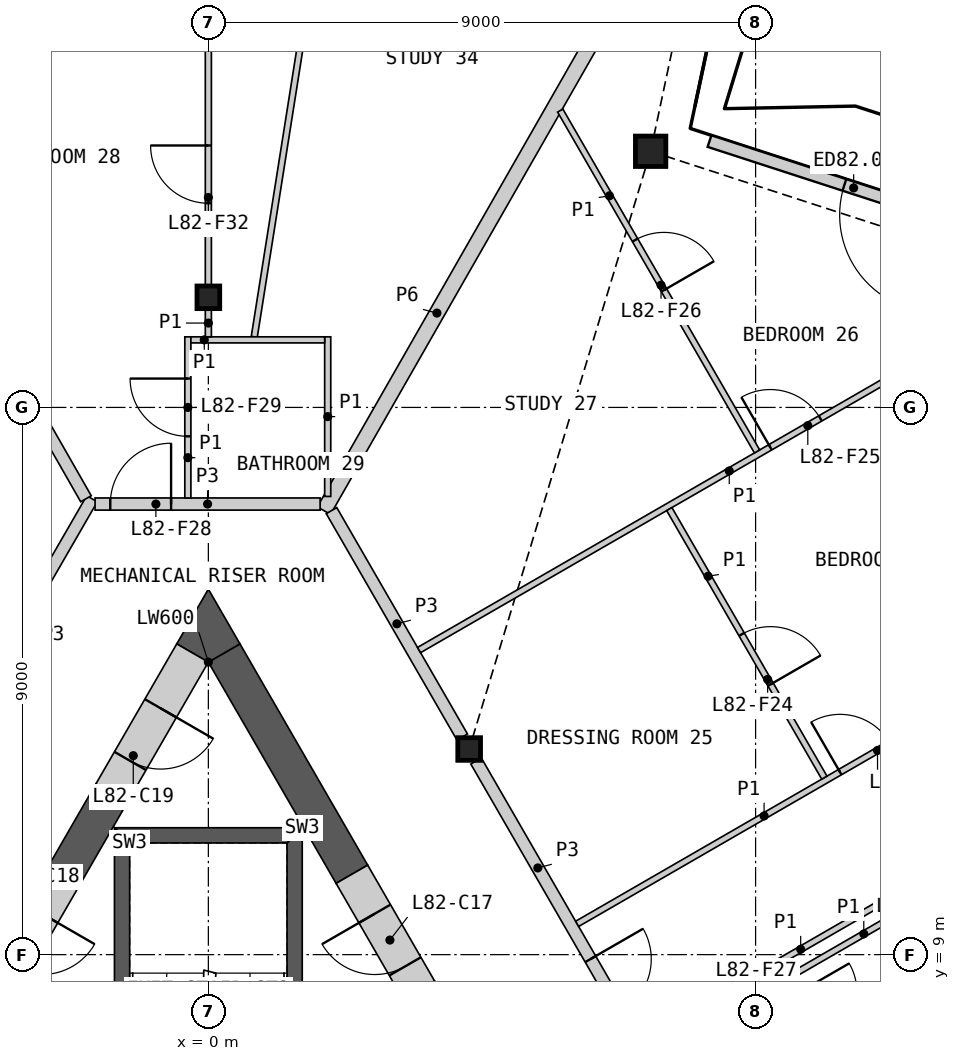
"""IFC4 building model, lengths in metres.
Left out: names, types, materials, properties, quantities, classifications, styles, units other than length and angle.
Written with IfcOpenShell. Run it as: python <this file> out.ifc"""

import sys

from ifc_helpers import new_model, si_unit, direction, frame, frame_2d, origin, origin_2d, place, context, subcontext, project, spatial, polyline, rectangle, hollow_rectangle, i_section, outline, extrude, element, fill, save


model = new_model("IFC4")
c1 = context("Model", 3, precision=1e-05, world=origin(), true_north=direction((0.0, 1.0)))
c2 = subcontext(c1, "Body", "Model", "MODEL_VIEW")
j1 = project(units=[si_unit("LENGTHUNIT", "METRE"), si_unit("PLANEANGLEUNIT", "RADIAN")], contexts=[c1])
p1 = place(None, origin())
s1 = spatial("IfcSite", under=j1, at=p1, CompositionType="ELEMENT")
p2 = place(p1, origin())
s2 = spatial("IfcBuilding", under=s1, at=p2, CompositionType="ELEMENT")
p3 = place(p2, frame((0.0, 0.0, 367.8)))
s3 = spatial("IfcBuildingStorey", under=s2, at=p3, CompositionType="ELEMENT", Elevation=367.8)
p4 = place(p3, frame((7.274, 22.213, 0.0), z_axis=(0.0, 0.0, 1.0), x_axis=(1.0, 0.0, 0.0)))
e1 = element("IfcColumn", 1, at=p4, inside=s3, PredefinedType="COLUMN", context=c2, shape_type="SweptSolid", body=[
    extrude(hollow_rectangle(XDim=0.5, YDim=0.5, WallThickness=0.03, at=origin_2d()), origin(), (0.0, 0.0, 1.0), 3.4),
])
for number, where, z_axis, x_axis in (
    (2, (0.0, 19.811, 0.0), (0.0, 0.0, 1.0), (1.0, 0.0, 0.0)),
    (3, (4.289, 12.382, 0.0), (0.0, 0.0, 1.0), (1.0, 0.0, 0.0)),
):
    element("IfcColumn", number, at=place(p3, frame(where, z_axis=z_axis, x_axis=x_axis)), inside=s3, PredefinedType="COLUMN", context=c2, shape_type="SweptSolid", body=[
        extrude(i_section(OverallWidth=0.374, OverallDepth=0.372, WebThickness=0.016, FlangeThickness=0.026, at=origin_2d()), origin(), (0.0, 0.0, 1.0), 3.4),
    ])
p5 = place(p3, frame((14.331, 20.402, 0.0), z_axis=(0.0, 0.0, 1.0), x_axis=(-0.951058447414, 0.30901105094, 0.0)))
e4 = element("IfcWall", 4, at=p5, inside=s3, PredefinedType="SOLIDWALL", context=c2, shape_type="SweptSolid", body=[
    extrude(rectangle(XDim=6.402, YDim=0.2, at=frame_2d((3.201, 0.0))), origin(), (0.0, 0.0, 1.0), 2.634),
])
p6 = place(p5, frame((2.469, 0.0, 0.0)))
e5 = element("IfcOpeningElement", 5, at=p6, cuts=e4, PredefinedType="OPENING", context=c2, shape_type="SweptSolid", body=[
    extrude(rectangle(XDim=1.6, YDim=2.25, at=frame_2d((0.8, 1.125))), frame((0.0, 0.11, 0.0), z_axis=(0.0, -1.0, 0.0), x_axis=(1.0, 0.0, 0.0)), (0.0, 0.0, 1.0), 0.22),
])
p7 = place(p3, origin())
e6 = element("IfcWall", 6, at=p7, inside=s3, PredefinedType="SHEAR", context=c2, shape_type="SweptSolid", body=[
    extrude(outline(polyline([(1.544, 5.237), (1.544, 11.087), (1.294, 10.837), (1.294, 5.237), (1.544, 5.237)])), origin(), (0.0, 0.0, 1.0), 3.1),
])
p8 = place(p3, origin())
e7 = element("IfcWall", 7, at=p8, inside=s3, PredefinedType="SHEAR", context=c2, shape_type="SweptSolid", body=[
    extrude(outline(polyline([(1.544, 11.087), (-1.544, 11.087), (-1.294, 10.837), (1.294, 10.837), (1.544, 11.087)])), origin(), (0.0, 0.0, 1.0), 3.1),
])
p9 = place(p3, origin())
e8 = element("IfcWall", 8, at=p9, inside=s3, PredefinedType="SHEAR", context=c2, shape_type="SweptSolid", body=[
    extrude(outline(polyline([(-1.294, 10.837), (-1.544, 11.087), (-1.544, 5.237), (-1.294, 5.237), (-1.294, 10.837)])), origin(), (0.0, 0.0, 1.0), 3.1),
])
p10 = place(p3, frame((8.686, -0.634, 0.0), z_axis=(0.0, 0.0, 1.0), x_axis=(-0.50001836461, 0.866014800712, 0.0)))
e9 = element("IfcWall", 9, at=p10, inside=s3, PredefinedType="SHEAR", context=c2, shape_type="SweptSolid", body=[
    extrude(rectangle(XDim=10.451, YDim=0.6, at=frame_2d((5.225, 0.0))), origin(), (0.0, 0.0, 1.0), 3.1),
])
p11 = place(p3, frame((2.361, 10.322, 0.0), z_axis=(0.0, 0.0, 1.0), x_axis=(-0.500000735859, 0.866024978935, 0.0)))
e10 = element("IfcWall", 10, at=p11, inside=s3, PredefinedType="SHEAR", context=c2, shape_type="SweptSolid", body=[
    extrude(rectangle(XDim=4.202, YDim=0.6, at=frame_2d((2.101, 0.0))), origin(), (0.0, 0.0, 1.0), 3.1),
])
p12 = place(p3, frame((-1.59, 11.658, 0.0), z_axis=(0.0, 0.0, 1.0), x_axis=(-0.500037594623, -0.866003697431, 0.0)))
e11 = element("IfcWall", 11, at=p12, inside=s3, PredefinedType="SHEAR", context=c2, shape_type="SweptSolid", body=[
    extrude(rectangle(XDim=1.542, YDim=0.6, at=frame_2d((0.771, 0.0))), origin(), (0.0, 0.0, 1.0), 3.1),
])
p13 = place(p3, origin())
e12 = element("IfcWall", 12, at=p13, inside=s3, PredefinedType="SHEAR", context=c2, shape_type="SweptSolid", body=[
    extrude(outline(polyline([(0.0, 13.811), (-0.52, 14.111), (0.0, 15.011), (0.52, 14.111), (0.0, 13.811)])), origin(), (0.0, 0.0, 1.0), 3.1),
])
p14 = place(p3, frame((3.461, 8.417, 0.0), z_axis=(0.0, 0.0, 1.0), x_axis=(-0.499946605688, 0.86605622881, 0.0)))
e13 = element("IfcWall", 13, at=p14, inside=s3, PredefinedType="SHEAR", context=c2, shape_type="SweptSolid", body=[
    extrude(rectangle(XDim=2.2, YDim=0.6, at=frame_2d((1.1, 0.0))), origin(), (0.0, 0.0, 1.0), 3.1),
])
p15 = place(p14, frame((0.45, 0.0, 0.0)))
e14 = element("IfcOpeningElement", 14, at=p15, cuts=e13, PredefinedType="OPENING", context=c2, shape_type="SweptSolid", body=[
    extrude(rectangle(XDim=1.0, YDim=2.1, at=frame_2d((0.5, 1.05))), frame((0.0, 0.31, 0.0), z_axis=(0.0, -1.0, 0.0), x_axis=(1.0, 0.0, 0.0)), (0.0, 0.0, 1.0), 0.62),
])
p16 = place(p3, frame((-2.361, 10.322, 0.0), z_axis=(0.0, 0.0, 1.0), x_axis=(-0.499946605688, -0.86605622881, 0.0)))
e15 = element("IfcWall", 15, at=p16, inside=s3, PredefinedType="SHEAR", context=c2, shape_type="SweptSolid", body=[
    extrude(rectangle(XDim=2.2, YDim=0.6, at=frame_2d((1.1, 0.0))), origin(), (0.0, 0.0, 1.0), 3.1),
])
p17 = place(p16, frame((0.75, 0.0, 0.0)))
e16 = element("IfcOpeningElement", 16, at=p17, cuts=e15, PredefinedType="OPENING", context=c2, shape_type="SweptSolid", body=[
    extrude(rectangle(XDim=1.0, YDim=2.1, at=frame_2d((0.5, 1.05))), frame((0.0, 0.31, 0.0), z_axis=(0.0, -1.0, 0.0), x_axis=(1.0, 0.0, 0.0)), (0.0, 0.0, 1.0), 0.62),
])
p18 = place(p3, frame((-0.26, 13.961, 0.0), z_axis=(0.0, 0.0, 1.0), x_axis=(-0.49997936161, -0.866037319036, 0.0)))
e17 = element("IfcWall", 17, at=p18, inside=s3, PredefinedType="SHEAR", context=c2, shape_type="SweptSolid", body=[
    extrude(rectangle(XDim=2.66, YDim=0.6, at=frame_2d((1.33, 0.0))), origin(), (0.0, 0.0, 1.0), 3.1),
])
p19 = place(p18, frame((1.05, 0.0, 0.0)))
e18 = element("IfcOpeningElement", 18, at=p19, cuts=e17, PredefinedType="OPENING", context=c2, shape_type="SweptSolid", body=[
    extrude(rectangle(XDim=1.0, YDim=2.1, at=frame_2d((0.5, 1.05))), frame((0.0, 0.31, 0.0), z_axis=(0.0, -1.0, 0.0), x_axis=(1.0, 0.0, 0.0)), (0.0, 0.0, 1.0), 0.62),
])
p20 = place(p3, frame((1.901, 16.302, 0.0), z_axis=(0.0, 0.0, 1.0), x_axis=(0.496368960053, 0.86811166073, 0.0)))
e19 = element("IfcWall", 19, at=p20, inside=s3, PredefinedType="PARTITIONING", context=c2, shape_type="SweptSolid", body=[
    extrude(rectangle(XDim=14.972, YDim=0.25, at=frame_2d((7.486, 0.0))), origin(), (0.0, 0.0, 1.0), 2.33),
])
p21 = place(p3, frame((4.403, 12.185, 0.0), z_axis=(0.0, 0.0, 1.0), x_axis=(0.499992155518, -0.866029932751, 0.0)))
e20 = element("IfcWall", 20, at=p21, inside=s3, PredefinedType="PARTITIONING", context=c2, shape_type="SweptSolid", body=[
    extrude(rectangle(XDim=8.123, YDim=0.2, at=frame_2d((4.062, 0.0))), origin(), (0.0, 0.0, 1.0), 3.1),
])
p22 = place(p21, frame((3.762, 0.0, 0.0)))
e21 = element("IfcOpeningElement", 21, at=p22, cuts=e20, PredefinedType="OPENING", context=c2, shape_type="SweptSolid", body=[
    extrude(rectangle(XDim=1.0, YDim=2.1, at=frame_2d((0.5, 1.05))), frame((0.0, 0.11, 0.0), z_axis=(0.0, -1.0, 0.0), x_axis=(1.0, 0.0, 0.0)), (0.0, 0.0, 1.0), 0.22),
])
p23 = place(p3, frame((2.025, 16.303, 0.0), z_axis=(0.0, 0.0, 1.0), x_axis=(0.500004215162, -0.866022970146, 0.0)))
e22 = element("IfcWall", 22, at=p23, inside=s3, PredefinedType="PARTITIONING", context=c2, shape_type="SweptSolid", body=[
    extrude(rectangle(XDim=4.3, YDim=0.2, at=frame_2d((2.15, 0.0))), origin(), (0.0, 0.0, 1.0), 3.1),
])
p24 = place(p3, frame((-4.176, 12.579, 0.0), z_axis=(0.0, 0.0, 1.0), x_axis=(0.499974648164, 0.866040040179, 0.0)))
e23 = element("IfcWall", 23, at=p24, inside=s3, PredefinedType="PARTITIONING", context=c2, shape_type="SweptSolid", body=[
    extrude(rectangle(XDim=4.525, YDim=0.2, at=frame_2d((2.263, 0.0))), origin(), (0.0, 0.0, 1.0), 3.1),
])
p25 = place(p3, frame((-1.863, 16.411, 0.0), z_axis=(0.0, 0.0, 1.0), x_axis=(1.0, 0.0, 0.0)))
e24 = element("IfcWall", 24, at=p25, inside=s3, PredefinedType="PARTITIONING", context=c2, shape_type="SweptSolid", body=[
    extrude(rectangle(XDim=3.701, YDim=0.2, at=frame_2d((1.851, 0.0))), origin(), (0.0, 0.0, 1.0), 3.1),
])
p26 = place(p25, frame((0.25, 0.0, 0.0)))
e25 = element("IfcOpeningElement", 25, at=p26, cuts=e24, PredefinedType="OPENING", context=c2, shape_type="SweptSolid", body=[
    extrude(rectangle(XDim=1.0, YDim=2.1, at=frame_2d((0.5, 1.05))), frame((0.0, 0.11, 0.0), z_axis=(0.0, -1.0, 0.0), x_axis=(1.0, 0.0, 0.0)), (0.0, 0.0, 1.0), 0.22),
])
p27 = place(p3, frame((-9.362, 29.352, 0.0), z_axis=(0.0, 0.0, 1.0), x_axis=(0.496351997927, -0.868121359116, 0.0)))
e26 = element("IfcWall", 26, at=p27, inside=s3, PredefinedType="PARTITIONING", context=c2, shape_type="SweptSolid", body=[
    extrude(rectangle(XDim=14.807, YDim=0.2, at=frame_2d((7.404, 0.0))), origin(), (0.0, 0.0, 1.0), 2.33),
])
p28 = place(p3, frame((8.775, 5.066, 0.0), z_axis=(0.0, 0.0, 1.0), x_axis=(0.866023724155, 0.500002909193, 0.0)))
e27 = element("IfcWall", 27, at=p28, inside=s3, PredefinedType="PARTITIONING", context=c2, shape_type="SweptSolid", body=[
    extrude(rectangle(XDim=11.655, YDim=0.2, at=frame_2d((5.827, 0.0))), origin(), (0.0, 0.0, 1.0), 2.33),
])
p29 = place(p3, frame((0.755, 19.16, 0.0), z_axis=(0.0, 0.0, 1.0), x_axis=(0.15643456532, 0.987688324712, 0.0)))
e28 = element("IfcWall", 28, at=p29, inside=s3, PredefinedType="PARTITIONING", context=c2, shape_type="SweptSolid", body=[
    extrude(rectangle(XDim=12.59, YDim=0.1, at=frame_2d((6.295, 0.0))), origin(), (0.0, 0.0, 1.0), 2.33),
])
p30 = place(p29, frame((7.074, 0.0, 0.0)))
e29 = element("IfcOpeningElement", 29, at=p30, cuts=e28, PredefinedType="OPENING", context=c2, shape_type="SweptSolid", body=[
    extrude(rectangle(XDim=0.95, YDim=2.1, at=frame_2d((0.475, 1.05))), frame((0.0, 0.06, 0.0), z_axis=(0.0, -1.0, 0.0), x_axis=(1.0, 0.0, 0.0)), (0.0, 0.0, 1.0), 0.12),
])
p31 = place(p3, frame((3.465, 14.01, 0.0), z_axis=(0.0, 0.0, 1.0), x_axis=(0.866032376801, 0.499987922186, 0.0)))
e30 = element("IfcWall", 30, at=p31, inside=s3, PredefinedType="PARTITIONING", context=c2, shape_type="SweptSolid", body=[
    extrude(rectangle(XDim=11.782, YDim=0.1, at=frame_2d((5.891, 0.0))), origin(), (0.0, 0.0, 1.0), 2.33),
])
p32 = place(p31, frame((6.67, 0.0, 0.0)))
e31 = element("IfcOpeningElement", 31, at=p32, cuts=e30, PredefinedType="OPENING", context=c2, shape_type="SweptSolid", body=[
    extrude(rectangle(XDim=0.95, YDim=2.1, at=frame_2d((0.475, 1.05))), frame((0.0, 0.06, 0.0), z_axis=(0.0, -1.0, 0.0), x_axis=(1.0, 0.0, 0.0)), (0.0, 0.0, 1.0), 0.12),
])
p33 = place(p3, frame((0.0, 20.008, 0.0), z_axis=(0.0, 0.0, 1.0), x_axis=(0.0, 1.0, 0.0)))
e32 = element("IfcWall", 32, at=p33, inside=s3, PredefinedType="PARTITIONING", context=c2, shape_type="SweptSolid", body=[
    extrude(rectangle(XDim=10.951, YDim=0.1, at=frame_2d((5.476, 0.0))), origin(), (0.0, 0.0, 1.0), 2.33),
])
p34 = place(p33, frame((1.35, 0.0, 0.0)))
e33 = element("IfcOpeningElement", 33, at=p34, cuts=e32, PredefinedType="OPENING", context=c2, shape_type="SweptSolid", body=[
    extrude(rectangle(XDim=0.95, YDim=2.1, at=frame_2d((0.475, 1.05))), frame((0.0, 0.06, 0.0), z_axis=(0.0, -1.0, 0.0), x_axis=(1.0, 0.0, 0.0)), (0.0, 0.0, 1.0), 0.12),
])
p35 = place(p3, frame((6.065, 9.506, 0.0), z_axis=(0.0, 0.0, 1.0), x_axis=(0.866018949465, 0.500011179042, 0.0)))
e34 = element("IfcWall", 34, at=p35, inside=s3, PredefinedType="PARTITIONING", context=c2, shape_type="SweptSolid", body=[
    extrude(rectangle(XDim=7.1, YDim=0.1, at=frame_2d((3.55, 0.0))), origin(), (0.0, 0.0, 1.0), 2.33),
])
p36 = place(p35, frame((4.992, 0.0, 0.0)))
e35 = element("IfcOpeningElement", 35, at=p36, cuts=e34, PredefinedType="OPENING", context=c2, shape_type="SweptSolid", body=[
    extrude(rectangle(XDim=0.95, YDim=2.1, at=frame_2d((0.475, 1.05))), frame((0.0, 0.06, 0.0), z_axis=(0.0, -1.0, 0.0), x_axis=(1.0, 0.0, 0.0)), (0.0, 0.0, 1.0), 0.12),
])
p37 = place(p3, frame((5.787, 22.882, 0.0), z_axis=(0.0, 0.0, 1.0), x_axis=(0.500001069878, -0.866024786089, 0.0)))
e36 = element("IfcWall", 36, at=p37, inside=s3, PredefinedType="PARTITIONING", context=c2, shape_type="SweptSolid", body=[
    extrude(rectangle(XDim=6.473, YDim=0.1, at=frame_2d((3.236, 0.0))), origin(), (0.0, 0.0, 1.0), 2.33),
])
p38 = place(p37, frame((2.46, 0.0, 0.0)))
e37 = element("IfcOpeningElement", 37, at=p38, cuts=e36, PredefinedType="OPENING", context=c2, shape_type="SweptSolid", body=[
    extrude(rectangle(XDim=0.95, YDim=2.1, at=frame_2d((0.475, 1.05))), frame((0.0, 0.06, 0.0), z_axis=(0.0, -1.0, 0.0), x_axis=(1.0, 0.0, 0.0)), (0.0, 0.0, 1.0), 0.12),
])
p39 = place(p3, frame((7.165, 7.601, 0.0), z_axis=(0.0, 0.0, 1.0), x_axis=(0.866017493347, 0.500013701029, 0.0)))
e38 = element("IfcWall", 38, at=p39, inside=s3, PredefinedType="PARTITIONING", context=c2, shape_type="SweptSolid", body=[
    extrude(rectangle(XDim=5.95, YDim=0.1, at=frame_2d((2.975, 0.0))), origin(), (0.0, 0.0, 1.0), 2.33),
])
p40 = place(p3, frame((7.581, 16.328, 0.0), z_axis=(0.0, 0.0, 1.0), x_axis=(0.500005610874, -0.86602216432, 0.0)))
e39 = element("IfcWall", 39, at=p40, inside=s3, PredefinedType="PARTITIONING", context=c2, shape_type="SweptSolid", body=[
    extrude(rectangle(XDim=5.1, YDim=0.1, at=frame_2d((2.55, 0.0))), origin(), (0.0, 0.0, 1.0), 2.33),
])
p41 = place(p40, frame((2.379, 0.0, 0.0)))
e40 = element("IfcOpeningElement", 40, at=p41, cuts=e39, PredefinedType="OPENING", context=c2, shape_type="SweptSolid", body=[
    extrude(rectangle(XDim=0.95, YDim=2.1, at=frame_2d((0.475, 1.05))), frame((0.0, 0.06, 0.0), z_axis=(0.0, -1.0, 0.0), x_axis=(1.0, 0.0, 0.0)), (0.0, 0.0, 1.0), 0.12),
])
p42 = place(p3, frame((9.523, 8.616, 0.0), z_axis=(0.0, 0.0, 1.0), x_axis=(0.866032775405, 0.499987231761, 0.0)))
e41 = element("IfcWall", 41, at=p42, inside=s3, PredefinedType="PARTITIONING", context=c2, shape_type="SweptSolid", body=[
    extrude(rectangle(XDim=2.9, YDim=0.1, at=frame_2d((1.45, 0.0))), origin(), (0.0, 0.0, 1.0), 2.33),
])
p43 = place(p3, frame((-0.337, 16.511, 0.0), z_axis=(0.0, 0.0, 1.0), x_axis=(0.0, 1.0, 0.0)))
e42 = element("IfcWall", 42, at=p43, inside=s3, PredefinedType="PARTITIONING", context=c2, shape_type="SweptSolid", body=[
    extrude(rectangle(XDim=2.65, YDim=0.1, at=frame_2d((1.325, 0.0))), origin(), (0.0, 0.0, 1.0), 2.33),
])
p44 = place(p43, frame((1.014, 0.0, 0.0)))
e43 = element("IfcOpeningElement", 43, at=p44, cuts=e42, PredefinedType="OPENING", context=c2, shape_type="SweptSolid", body=[
    extrude(rectangle(XDim=0.95, YDim=2.1, at=frame_2d((0.475, 1.05))), frame((0.0, 0.06, 0.0), z_axis=(0.0, -1.0, 0.0), x_axis=(1.0, 0.0, 0.0)), (0.0, 0.0, 1.0), 0.12),
])
p45 = place(p3, frame((1.963, 16.536, 0.0), z_axis=(0.0, 0.0, 1.0), x_axis=(0.0, 1.0, 0.0)))
e44 = element("IfcWall", 44, at=p45, inside=s3, PredefinedType="PARTITIONING", context=c2, shape_type="SweptSolid", body=[
    extrude(rectangle(XDim=2.625, YDim=0.1, at=frame_2d((1.312, 0.0))), origin(), (0.0, 0.0, 1.0), 2.33),
])
p46 = place(p3, frame((9.592, 8.598, 0.0), z_axis=(0.0, 0.0, 1.0), x_axis=(0.499990435942, -0.866030925526, 0.0)))
e45 = element("IfcWall", 45, at=p46, inside=s3, PredefinedType="PARTITIONING", context=c2, shape_type="SweptSolid", body=[
    extrude(rectangle(XDim=2.55, YDim=0.1, at=frame_2d((1.275, 0.0))), origin(), (0.0, 0.0, 1.0), 2.33),
])
p47 = place(p46, frame((0.25, 0.0, 0.0)))
e46 = element("IfcOpeningElement", 46, at=p47, cuts=e45, PredefinedType="OPENING", context=c2, shape_type="SweptSolid", body=[
    extrude(rectangle(XDim=0.95, YDim=2.1, at=frame_2d((0.475, 1.05))), frame((0.0, 0.06, 0.0), z_axis=(0.0, -1.0, 0.0), x_axis=(1.0, 0.0, 0.0)), (0.0, 0.0, 1.0), 0.12),
])
p48 = place(p3, frame((-0.287, 19.111, 0.0), z_axis=(0.0, 0.0, 1.0), x_axis=(1.0, 0.0, 0.0)))
e47 = element("IfcWall", 47, at=p48, inside=s3, PredefinedType="PARTITIONING", context=c2, shape_type="SweptSolid", body=[
    extrude(rectangle(XDim=2.2, YDim=0.1, at=frame_2d((1.1, 0.0))), origin(), (0.0, 0.0, 1.0), 2.33),
])
p49 = place(p3, frame((0.0, 19.161, 0.0), z_axis=(0.0, 0.0, 1.0), x_axis=(0.0, 1.0, 0.0)))
e48 = element("IfcWall", 48, at=p49, inside=s3, PredefinedType="PARTITIONING", context=c2, shape_type="SweptSolid", body=[
    extrude(rectangle(XDim=0.453, YDim=0.1, at=frame_2d((0.227, 0.0))), origin(), (0.0, 0.0, 1.0), 2.33),
])
p50 = place(p6, origin())
e49 = element("IfcDoor", 49, at=p50, inside=s3, OperationType="DOUBLE_DOOR_SINGLE_SWING", PredefinedType="DOOR", context=c2, shape_type="SweptSolid", body=[
    extrude(rectangle(XDim=1.6, YDim=2.25, at=frame_2d((0.8, 1.125))), frame((0.0, 0.025, 0.0), z_axis=(0.0, -1.0, 0.0), x_axis=(1.0, 0.0, 0.0)), (0.0, 0.0, 1.0), 0.05),
])
fill(e5, e49)
p51 = place(p15, origin())
e50 = element("IfcDoor", 50, at=p51, inside=s3, OperationType="SINGLE_SWING_RIGHT", PredefinedType="DOOR", context=c2, shape_type="SweptSolid", body=[
    extrude(rectangle(XDim=1.0, YDim=2.1, at=frame_2d((0.5, 1.05))), frame((0.0, 0.055, 0.0), z_axis=(0.0, -1.0, 0.0), x_axis=(1.0, 0.0, 0.0)), (0.0, 0.0, 1.0), 0.05),
])
fill(e14, e50)
p52 = place(p19, origin())
e51 = element("IfcDoor", 51, at=p52, inside=s3, OperationType="SINGLE_SWING_LEFT", PredefinedType="DOOR", context=c2, shape_type="SweptSolid", body=[
    extrude(rectangle(XDim=1.0, YDim=2.1, at=frame_2d((0.5, 1.05))), frame((0.0, 0.055, 0.0), z_axis=(0.0, -1.0, 0.0), x_axis=(1.0, 0.0, 0.0)), (0.0, 0.0, 1.0), 0.05),
])
fill(e18, e51)
p53 = place(p22, origin())
e52 = element("IfcDoor", 52, at=p53, inside=s3, OperationType="SINGLE_SWING_LEFT", PredefinedType="DOOR", context=c2, shape_type="SweptSolid", body=[
    extrude(rectangle(XDim=1.0, YDim=2.1, at=frame_2d((0.5, 1.05))), frame((0.0, 0.025, 0.0), z_axis=(0.0, -1.0, 0.0), x_axis=(1.0, 0.0, 0.0)), (0.0, 0.0, 1.0), 0.05),
])
fill(e21, e52)
p54 = place(p36, origin())
e53 = element("IfcDoor", 53, at=p54, inside=s3, OperationType="SINGLE_SWING_LEFT", PredefinedType="DOOR", context=c2, shape_type="SweptSolid", body=[
    extrude(rectangle(XDim=0.95, YDim=2.1, at=frame_2d((0.475, 1.05))), frame((0.0, 0.025, 0.0), z_axis=(0.0, -1.0, 0.0), x_axis=(1.0, 0.0, 0.0)), (0.0, 0.0, 1.0), 0.05),
])
fill(e35, e53)
p55 = place(p41, origin())
e54 = element("IfcDoor", 54, at=p55, inside=s3, OperationType="SINGLE_SWING_RIGHT", PredefinedType="DOOR", context=c2, shape_type="SweptSolid", body=[
    extrude(rectangle(XDim=0.95, YDim=2.1, at=frame_2d((0.475, 1.05))), frame((0.0, 0.025, 0.0), z_axis=(0.0, -1.0, 0.0), x_axis=(1.0, 0.0, 0.0)), (0.0, 0.0, 1.0), 0.05),
])
fill(e40, e54)
p56 = place(p32, origin())
e55 = element("IfcDoor", 55, at=p56, inside=s3, OperationType="SINGLE_SWING_LEFT", PredefinedType="DOOR", context=c2, shape_type="SweptSolid", body=[
    extrude(rectangle(XDim=0.95, YDim=2.1, at=frame_2d((0.475, 1.05))), frame((0.0, 0.025, 0.0), z_axis=(0.0, -1.0, 0.0), x_axis=(1.0, 0.0, 0.0)), (0.0, 0.0, 1.0), 0.05),
])
fill(e31, e55)
p57 = place(p38, origin())
e56 = element("IfcDoor", 56, at=p57, inside=s3, OperationType="SINGLE_SWING_RIGHT", PredefinedType="DOOR", context=c2, shape_type="SweptSolid", body=[
    extrude(rectangle(XDim=0.95, YDim=2.1, at=frame_2d((0.475, 1.05))), frame((0.0, 0.025, 0.0), z_axis=(0.0, -1.0, 0.0), x_axis=(1.0, 0.0, 0.0)), (0.0, 0.0, 1.0), 0.05),
])
fill(e37, e56)
p58 = place(p26, origin())
e57 = element("IfcDoor", 57, at=p58, inside=s3, OperationType="SINGLE_SWING_RIGHT", PredefinedType="DOOR", context=c2, shape_type="SweptSolid", body=[
    extrude(rectangle(XDim=1.0, YDim=2.1, at=frame_2d((0.5, 1.05))), frame((0.0, 0.025, 0.0), z_axis=(0.0, -1.0, 0.0), x_axis=(1.0, 0.0, 0.0)), (0.0, 0.0, 1.0), 0.05),
])
fill(e25, e57)
p59 = place(p44, origin())
e58 = element("IfcDoor", 58, at=p59, inside=s3, OperationType="SINGLE_SWING_RIGHT", PredefinedType="DOOR", context=c2, shape_type="SweptSolid", body=[
    extrude(rectangle(XDim=0.95, YDim=2.1, at=frame_2d((0.475, 1.05))), frame((0.0, 0.025, 0.0), z_axis=(0.0, -1.0, 0.0), x_axis=(1.0, 0.0, 0.0)), (0.0, 0.0, 1.0), 0.05),
])
fill(e43, e58)
p60 = place(p34, origin())
e59 = element("IfcDoor", 59, at=p60, inside=s3, OperationType="SINGLE_SWING_RIGHT", PredefinedType="DOOR", context=c2, shape_type="SweptSolid", body=[
    extrude(rectangle(XDim=0.95, YDim=2.1, at=frame_2d((0.475, 1.05))), frame((0.0, 0.025, 0.0), z_axis=(0.0, -1.0, 0.0), x_axis=(1.0, 0.0, 0.0)), (0.0, 0.0, 1.0), 0.05),
])
fill(e33, e59)
save(model, sys.argv[1])
